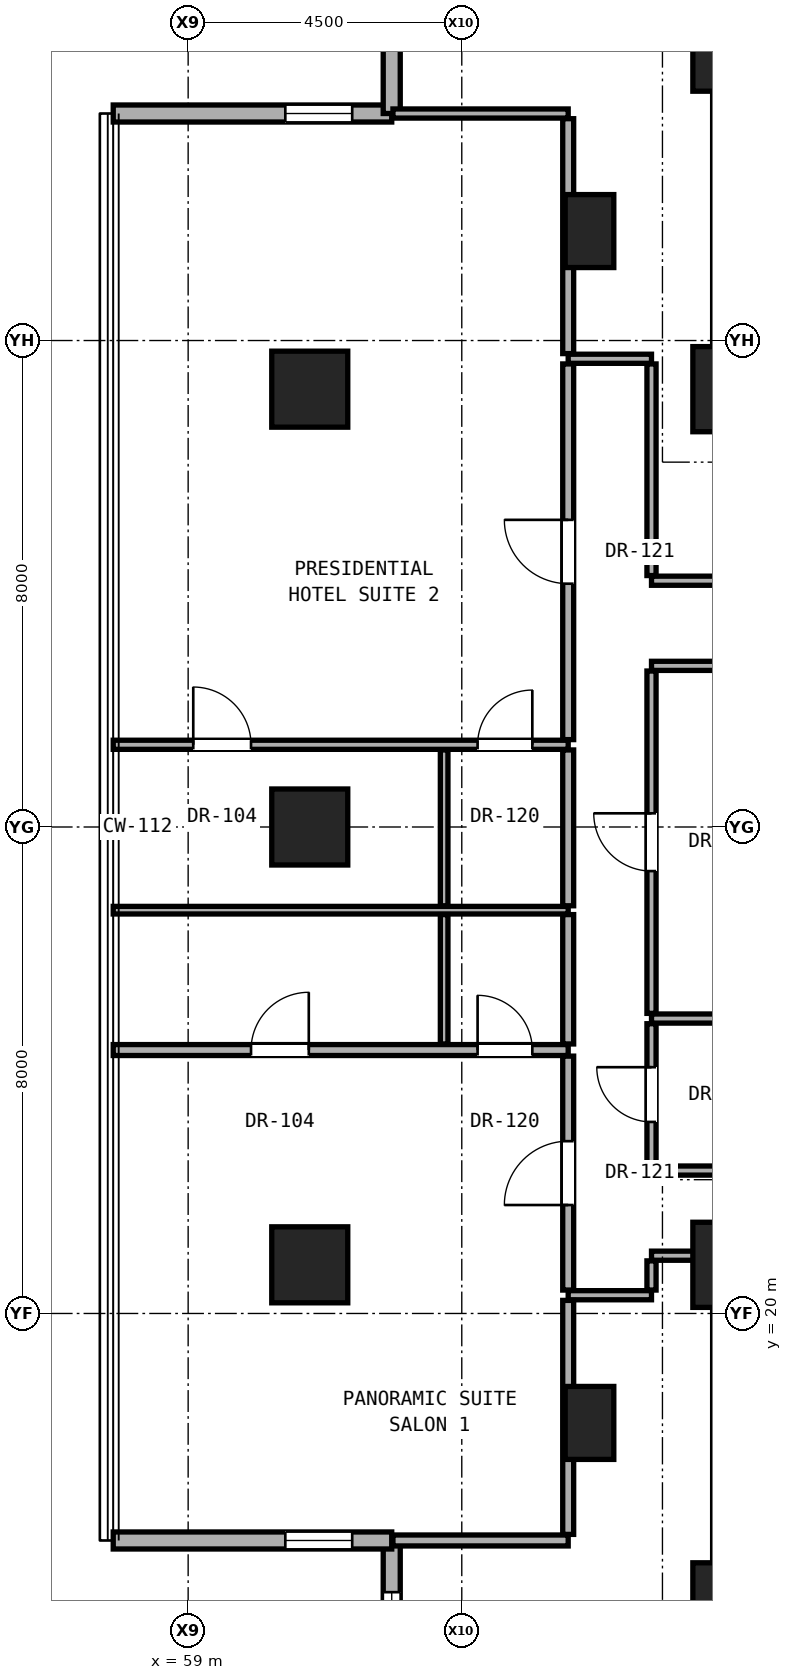
"""IFC4 building model, lengths in metres.
Left out: names, types, materials, properties, quantities, classifications, styles, units other than length and angle.
Written with IfcOpenShell. Run it as: python <this file> out.ifc"""

import sys

from ifc_helpers import new_model, si_unit, direction, frame, frame_2d, origin, origin_2d, place, context, subcontext, project, spatial, rectangle, hollow_rectangle, extrude, element, fill, save


model = new_model("IFC4")
c1 = context("Model", 3, precision=1e-05, world=origin(), true_north=direction((0.0, 1.0)))
c2 = subcontext(c1, "Body", "Model", "MODEL_VIEW")
j1 = project(units=[si_unit("LENGTHUNIT", "METRE"), si_unit("PLANEANGLEUNIT", "RADIAN")], contexts=[c1])
p1 = place(None, origin())
s1 = spatial("IfcSite", under=j1, at=p1, CompositionType="ELEMENT")
p2 = place(p1, origin())
s2 = spatial("IfcBuilding", under=s1, at=p2, CompositionType="ELEMENT")
p3 = place(p2, frame((0.0, 0.0, 35.6)))
s3 = spatial("IfcBuildingStorey", under=s2, at=p3, CompositionType="ELEMENT", Elevation=35.6)
for number, where, z_axis, x_axis in (
    (1, (68.0, 15.2, 0.0), (0.0, 0.0, 1.0), (1.0, 0.0, 0.0)),
    (2, (68.0, 20.8, 0.0), (0.0, 0.0, 1.0), (1.0, 0.0, 0.0)),
    (3, (68.0, 35.2, 0.0), (0.0, 0.0, 1.0), (1.0, 0.0, 0.0)),
    (4, (68.0, 40.8, 0.0), (0.0, 0.0, 1.0), (1.0, 0.0, 0.0)),
):
    element("IfcColumn", number, at=place(p3, frame(where, z_axis=z_axis, x_axis=x_axis)), inside=s3, PredefinedType="COLUMN", context=c2, shape_type="SweptSolid", body=[
        extrude(rectangle(XDim=1.4, YDim=1.4, at=origin_2d()), origin(), (0.0, 0.0, 1.0), 3.3),
    ])
for number, where, z_axis, x_axis in (
    (5, (61.0, 20.8, 0.0), (0.0, 0.0, 1.0), (1.0, 0.0, 0.0)),
    (6, (61.0, 28.0, 0.0), (0.0, 0.0, 1.0), (1.0, 0.0, 0.0)),
    (7, (61.0, 35.2, 0.0), (0.0, 0.0, 1.0), (1.0, 0.0, 0.0)),
):
    element("IfcColumn", number, at=place(p3, frame(where, z_axis=z_axis, x_axis=x_axis)), inside=s3, PredefinedType="COLUMN", context=c2, shape_type="SweptSolid", body=[
        extrude(hollow_rectangle(XDim=1.25, YDim=1.25, WallThickness=0.07, at=origin_2d()), origin(), (0.0, 0.0, 1.0), 3.3),
    ])
for number, where, z_axis, x_axis in (
    (8, (65.6, 18.2, 0.0), (0.0, 0.0, 1.0), (1.0, 0.0, 0.0)),
    (9, (65.6, 37.8, 0.0), (0.0, 0.0, 1.0), (1.0, 0.0, 0.0)),
):
    element("IfcColumn", number, at=place(p3, frame(where, z_axis=z_axis, x_axis=x_axis)), inside=s3, PredefinedType="PILASTER", context=c2, shape_type="SweptSolid", body=[
        extrude(rectangle(XDim=0.8, YDim=1.2, at=origin_2d()), origin(), (0.0, 0.0, 1.0), 3.3),
    ])
p4 = place(p3, frame((62.348, 16.267, 0.0), z_axis=(0.0, 0.0, 1.0), x_axis=(0.0, -1.0, 0.0)))
e10 = element("IfcWall", 10, at=p4, inside=s3, PredefinedType="SOLIDWALL", context=c2, shape_type="SweptSolid", body=[
    extrude(rectangle(XDim=4.58, YDim=0.28, at=frame_2d((2.29, 0.0))), origin(), (0.0, 0.0, 1.0), 3.04),
])
p5 = place(p4, frame((0.85, 0.0, 0.79)))
e11 = element("IfcOpeningElement", 11, at=p5, cuts=e10, PredefinedType="OPENING", context=c2, shape_type="SweptSolid", body=[
    extrude(rectangle(XDim=1.8, YDim=2.1, at=frame_2d((0.9, 1.05))), frame((0.0, 0.15, 0.0), z_axis=(0.0, -1.0, 0.0), x_axis=(1.0, 0.0, 0.0)), (0.0, 0.0, 1.0), 0.3),
])
p6 = place(p3, frame((57.768, 16.267, 0.0), z_axis=(0.0, 0.0, 1.0), x_axis=(1.0, 0.0, 0.0)))
e12 = element("IfcWall", 12, at=p6, inside=s3, PredefinedType="SOLIDWALL", context=c2, shape_type="SweptSolid", body=[
    extrude(rectangle(XDim=4.58, YDim=0.28, at=frame_2d((2.29, 0.0))), origin(), (0.0, 0.0, 1.0), 3.04),
])
p7 = place(p6, frame((2.83, 0.0, 0.85)))
e13 = element("IfcOpeningElement", 13, at=p7, cuts=e12, PredefinedType="OPENING", context=c2, shape_type="SweptSolid", body=[
    extrude(rectangle(XDim=1.1, YDim=2.0, at=frame_2d((0.55, 1.0))), frame((0.0, 0.15, 0.0), z_axis=(0.0, -1.0, 0.0), x_axis=(1.0, 0.0, 0.0)), (0.0, 0.0, 1.0), 0.3),
])
p8 = place(p3, frame((62.348, 39.733, 0.0), z_axis=(0.0, 0.0, 1.0), x_axis=(-1.0, 0.0, 0.0)))
e14 = element("IfcWall", 14, at=p8, inside=s3, PredefinedType="SOLIDWALL", context=c2, shape_type="SweptSolid", body=[
    extrude(rectangle(XDim=4.58, YDim=0.28, at=frame_2d((2.29, 0.0))), origin(), (0.0, 0.0, 1.0), 3.04),
])
p9 = place(p8, frame((0.65, 0.0, 0.85)))
e15 = element("IfcOpeningElement", 15, at=p9, cuts=e14, PredefinedType="OPENING", context=c2, shape_type="SweptSolid", body=[
    extrude(rectangle(XDim=1.1, YDim=2.0, at=frame_2d((0.55, 1.0))), frame((0.0, 0.15, 0.0), z_axis=(0.0, -1.0, 0.0), x_axis=(1.0, 0.0, 0.0)), (0.0, 0.0, 1.0), 0.3),
])
p10 = place(p3, frame((62.348, 44.313, 0.0), z_axis=(0.0, 0.0, 1.0), x_axis=(0.0, -1.0, 0.0)))
e16 = element("IfcWall", 16, at=p10, inside=s3, PredefinedType="SOLIDWALL", context=c2, shape_type="SweptSolid", body=[
    extrude(rectangle(XDim=4.58, YDim=0.28, at=frame_2d((2.29, 0.0))), origin(), (0.0, 0.0, 1.0), 3.04),
])
p11 = place(p3, frame((62.368, 16.267, 0.0), z_axis=(0.0, 0.0, 1.0), x_axis=(1.0, 0.0, 0.0)))
e17 = element("IfcWall", 17, at=p11, inside=s3, PredefinedType="PARTITIONING", context=c2, shape_type="SweptSolid", body=[
    extrude(rectangle(XDim=2.882, YDim=0.18, at=frame_2d((1.441, 0.0))), origin(), (0.0, 0.0, 1.0), 3.06),
])
p12 = place(p3, frame((65.25, 20.3, 0.0), z_axis=(0.0, 0.0, 1.0), x_axis=(1.0, 0.0, 0.0)))
e18 = element("IfcWall", 18, at=p12, inside=s3, PredefinedType="PARTITIONING", context=c2, shape_type="SweptSolid", body=[
    extrude(rectangle(XDim=1.37, YDim=0.15, at=frame_2d((0.685, 0.0))), origin(), (0.0, 0.0, 1.0), 3.06),
])
p13 = place(p3, frame((66.62, 20.95, 0.0), z_axis=(0.0, 0.0, 1.0), x_axis=(1.0, 0.0, 0.0)))
e19 = element("IfcWall", 19, at=p13, inside=s3, PredefinedType="PARTITIONING", context=c2, shape_type="SweptSolid", body=[
    extrude(rectangle(XDim=1.01, YDim=0.15, at=frame_2d((0.505, 0.0))), origin(), (0.0, 0.0, 1.0), 2.452),
])
p14 = place(p3, frame((66.62, 22.35, 0.0), z_axis=(0.0, 0.0, 1.0), x_axis=(1.0, 0.0, 0.0)))
e20 = element("IfcWall", 20, at=p14, inside=s3, PredefinedType="PARTITIONING", context=c2, shape_type="SweptSolid", body=[
    extrude(rectangle(XDim=19.63, YDim=0.15, at=frame_2d((9.815, 0.0))), origin(), (0.0, 0.0, 1.0), 2.125),
])
p15 = place(p14, frame((12.085, 0.0, 0.0)))
e21 = element("IfcOpeningElement", 21, at=p15, cuts=e20, PredefinedType="OPENING", context=c2, shape_type="SweptSolid", body=[
    extrude(rectangle(XDim=0.85, YDim=2.01, at=frame_2d((0.425, 1.005))), frame((0.0, 0.085, 0.0), z_axis=(0.0, -1.0, 0.0), x_axis=(1.0, 0.0, 0.0)), (0.0, 0.0, 1.0), 0.17),
])
p16 = place(p3, frame((57.768, 24.332, 0.0), z_axis=(0.0, 0.0, 1.0), x_axis=(1.0, 0.0, 0.0)))
e22 = element("IfcWall", 22, at=p16, inside=s3, PredefinedType="PARTITIONING", context=c2, shape_type="SweptSolid", body=[
    extrude(rectangle(XDim=7.482, YDim=0.18, at=frame_2d((3.741, 0.0))), origin(), (0.0, 0.0, 1.0), 2.196),
])
p17 = place(p16, frame((2.266, 0.0, 0.0)))
e23 = element("IfcOpeningElement", 23, at=p17, cuts=e22, PredefinedType="OPENING", context=c2, shape_type="SweptSolid", body=[
    extrude(rectangle(XDim=0.95, YDim=2.15, at=frame_2d((0.475, 1.075))), frame((0.0, 0.1, 0.0), z_axis=(0.0, -1.0, 0.0), x_axis=(1.0, 0.0, 0.0)), (0.0, 0.0, 1.0), 0.2),
])
p18 = place(p16, frame((5.992, 0.0, 0.0)))
e24 = element("IfcOpeningElement", 24, at=p18, cuts=e22, PredefinedType="OPENING", context=c2, shape_type="SweptSolid", body=[
    extrude(rectangle(XDim=0.9, YDim=2.1, at=frame_2d((0.45, 1.05))), frame((0.0, 0.1, 0.0), z_axis=(0.0, -1.0, 0.0), x_axis=(1.0, 0.0, 0.0)), (0.0, 0.0, 1.0), 0.2),
])
p19 = place(p3, frame((66.62, 24.85, 0.0), z_axis=(0.0, 0.0, 1.0), x_axis=(1.0, 0.0, 0.0)))
e25 = element("IfcWall", 25, at=p19, inside=s3, PredefinedType="PARTITIONING", context=c2, shape_type="SweptSolid", body=[
    extrude(rectangle(XDim=3.13, YDim=0.15, at=frame_2d((1.565, 0.0))), origin(), (0.0, 0.0, 1.0), 2.125),
])
p20 = place(p3, frame((57.768, 26.632, 0.0), z_axis=(0.0, 0.0, 1.0), x_axis=(1.0, 0.0, 0.0)))
e26 = element("IfcWall", 26, at=p20, inside=s3, PredefinedType="PARTITIONING", context=c2, shape_type="SweptSolid", body=[
    extrude(rectangle(XDim=7.482, YDim=0.125, at=frame_2d((3.741, 0.0))), origin(), (0.0, 0.0, 1.0), 2.196),
])
p21 = place(p3, frame((57.768, 29.352, 0.0), z_axis=(0.0, 0.0, 1.0), x_axis=(1.0, 0.0, 0.0)))
e27 = element("IfcWall", 27, at=p21, inside=s3, PredefinedType="PARTITIONING", context=c2, shape_type="SweptSolid", body=[
    extrude(rectangle(XDim=7.482, YDim=0.15, at=frame_2d((3.741, 0.0))), origin(), (0.0, 0.0, 1.0), 2.196),
])
p22 = place(p21, frame((1.316, 0.0, 0.0)))
e28 = element("IfcOpeningElement", 28, at=p22, cuts=e27, PredefinedType="OPENING", context=c2, shape_type="SweptSolid", body=[
    extrude(rectangle(XDim=0.95, YDim=2.15, at=frame_2d((0.475, 1.075))), frame((0.0, 0.085, 0.0), z_axis=(0.0, -1.0, 0.0), x_axis=(1.0, 0.0, 0.0)), (0.0, 0.0, 1.0), 0.17),
])
p23 = place(p21, frame((5.992, 0.0, 0.0)))
e29 = element("IfcOpeningElement", 29, at=p23, cuts=e27, PredefinedType="OPENING", context=c2, shape_type="SweptSolid", body=[
    extrude(rectangle(XDim=0.9, YDim=2.1, at=frame_2d((0.45, 1.05))), frame((0.0, 0.085, 0.0), z_axis=(0.0, -1.0, 0.0), x_axis=(1.0, 0.0, 0.0)), (0.0, 0.0, 1.0), 0.17),
])
p24 = place(p3, frame((66.62, 30.65, 0.0), z_axis=(0.0, 0.0, 1.0), x_axis=(1.0, 0.0, 0.0)))
e30 = element("IfcWall", 30, at=p24, inside=s3, PredefinedType="PARTITIONING", context=c2, shape_type="SweptSolid", body=[
    extrude(rectangle(XDim=19.63, YDim=0.15, at=frame_2d((9.815, 0.0))), origin(), (0.0, 0.0, 1.0), 2.125),
])
p25 = place(p24, frame((3.855, 0.0, 0.0)))
e31 = element("IfcOpeningElement", 31, at=p25, cuts=e30, PredefinedType="OPENING", context=c2, shape_type="SweptSolid", body=[
    extrude(rectangle(XDim=0.85, YDim=2.01, at=frame_2d((0.425, 1.005))), frame((0.0, 0.085, 0.0), z_axis=(0.0, -1.0, 0.0), x_axis=(1.0, 0.0, 0.0)), (0.0, 0.0, 1.0), 0.17),
])
p26 = place(p24, frame((12.085, 0.0, 0.0)))
e32 = element("IfcOpeningElement", 32, at=p26, cuts=e30, PredefinedType="OPENING", context=c2, shape_type="SweptSolid", body=[
    extrude(rectangle(XDim=0.85, YDim=2.01, at=frame_2d((0.425, 1.005))), frame((0.0, 0.085, 0.0), z_axis=(0.0, -1.0, 0.0), x_axis=(1.0, 0.0, 0.0)), (0.0, 0.0, 1.0), 0.17),
])
p27 = place(p3, frame((66.62, 32.05, 0.0), z_axis=(0.0, 0.0, 1.0), x_axis=(1.0, 0.0, 0.0)))
e33 = element("IfcWall", 33, at=p27, inside=s3, PredefinedType="PARTITIONING", context=c2, shape_type="SweptSolid", body=[
    extrude(rectangle(XDim=2.18, YDim=0.15, at=frame_2d((1.09, 0.0))), origin(), (0.0, 0.0, 1.0), 2.125),
])
p28 = place(p3, frame((65.25, 35.7, 0.0), z_axis=(0.0, 0.0, 1.0), x_axis=(1.0, 0.0, 0.0)))
e34 = element("IfcWall", 34, at=p28, inside=s3, PredefinedType="PARTITIONING", context=c2, shape_type="SweptSolid", body=[
    extrude(rectangle(XDim=1.37, YDim=0.15, at=frame_2d((0.685, 0.0))), origin(), (0.0, 0.0, 1.0), 3.06),
])
p29 = place(p3, frame((62.368, 39.733, 0.0), z_axis=(0.0, 0.0, 1.0), x_axis=(1.0, 0.0, 0.0)))
e35 = element("IfcWall", 35, at=p29, inside=s3, PredefinedType="PARTITIONING", context=c2, shape_type="SweptSolid", body=[
    extrude(rectangle(XDim=2.882, YDim=0.15, at=frame_2d((1.441, 0.0))), origin(), (0.0, 0.0, 1.0), 3.06),
])
p30 = place(p3, frame((63.21, 24.432, 0.0), z_axis=(0.0, 0.0, 1.0), x_axis=(0.0, 1.0, 0.0)))
e36 = element("IfcWall", 36, at=p30, inside=s3, PredefinedType="PARTITIONING", context=c2, shape_type="SweptSolid", body=[
    extrude(rectangle(XDim=2.128, YDim=0.125, at=frame_2d((1.064, 0.0))), origin(), (0.0, 0.0, 1.0), 3.06),
])
p31 = place(p3, frame((63.21, 26.705, 0.0), z_axis=(0.0, 0.0, 1.0), x_axis=(0.0, 1.0, 0.0)))
e37 = element("IfcWall", 37, at=p31, inside=s3, PredefinedType="PARTITIONING", context=c2, shape_type="SweptSolid", body=[
    extrude(rectangle(XDim=2.562, YDim=0.125, at=frame_2d((1.281, 0.0))), origin(), (0.0, 0.0, 1.0), 2.279),
])
p32 = place(p3, frame((65.25, 16.367, 0.0), z_axis=(0.0, 0.0, 1.0), x_axis=(0.0, 1.0, 0.0)))
e38 = element("IfcWall", 38, at=p32, inside=s3, PredefinedType="PARTITIONING", context=c2, shape_type="SweptSolid", body=[
    extrude(rectangle(XDim=3.848, YDim=0.18, at=frame_2d((1.924, 0.0))), origin(), (0.0, 0.0, 1.0), 2.436),
])
p33 = place(p3, frame((65.25, 20.385, 0.0), z_axis=(0.0, 0.0, 1.0), x_axis=(0.0, 1.0, 0.0)))
e39 = element("IfcWall", 39, at=p33, inside=s3, PredefinedType="PARTITIONING", context=c2, shape_type="SweptSolid", body=[
    extrude(rectangle(XDim=3.847, YDim=0.18, at=frame_2d((1.923, 0.0))), origin(), (0.0, 0.0, 1.0), 2.452),
])
p34 = place(p33, frame((1.398, 0.0, 0.0)))
e40 = element("IfcOpeningElement", 40, at=p34, cuts=e39, PredefinedType="OPENING", context=c2, shape_type="SweptSolid", body=[
    extrude(rectangle(XDim=1.05, YDim=2.2, at=frame_2d((0.525, 1.1))), frame((0.0, 0.1, 0.0), z_axis=(0.0, -1.0, 0.0), x_axis=(1.0, 0.0, 0.0)), (0.0, 0.0, 1.0), 0.2),
])
p35 = place(p3, frame((65.25, 24.432, 0.0), z_axis=(0.0, 0.0, 1.0), x_axis=(0.0, 1.0, 0.0)))
e41 = element("IfcWall", 41, at=p35, inside=s3, PredefinedType="PARTITIONING", context=c2, shape_type="SweptSolid", body=[
    extrude(rectangle(XDim=2.128, YDim=0.18, at=frame_2d((1.064, 0.0))), origin(), (0.0, 0.0, 1.0), 3.06),
])
p36 = place(p3, frame((65.25, 26.705, 0.0), z_axis=(0.0, 0.0, 1.0), x_axis=(0.0, 1.0, 0.0)))
e42 = element("IfcWall", 42, at=p36, inside=s3, PredefinedType="PARTITIONING", context=c2, shape_type="SweptSolid", body=[
    extrude(rectangle(XDim=2.562, YDim=0.18, at=frame_2d((1.281, 0.0))), origin(), (0.0, 0.0, 1.0), 2.279),
])
p37 = place(p3, frame((65.25, 29.437, 0.0), z_axis=(0.0, 0.0, 1.0), x_axis=(0.0, 1.0, 0.0)))
e43 = element("IfcWall", 43, at=p37, inside=s3, PredefinedType="PARTITIONING", context=c2, shape_type="SweptSolid", body=[
    extrude(rectangle(XDim=6.178, YDim=0.18, at=frame_2d((3.089, 0.0))), origin(), (0.0, 0.0, 1.0), 2.452),
])
p38 = place(p37, frame((2.564, 0.0, 0.0)))
e44 = element("IfcOpeningElement", 44, at=p38, cuts=e43, PredefinedType="OPENING", context=c2, shape_type="SweptSolid", body=[
    extrude(rectangle(XDim=1.05, YDim=2.2, at=frame_2d((0.525, 1.1))), frame((0.0, 0.1, 0.0), z_axis=(0.0, -1.0, 0.0), x_axis=(1.0, 0.0, 0.0)), (0.0, 0.0, 1.0), 0.2),
])
p39 = place(p3, frame((65.25, 35.785, 0.0), z_axis=(0.0, 0.0, 1.0), x_axis=(0.0, 1.0, 0.0)))
e45 = element("IfcWall", 45, at=p39, inside=s3, PredefinedType="PARTITIONING", context=c2, shape_type="SweptSolid", body=[
    extrude(rectangle(XDim=3.863, YDim=0.18, at=frame_2d((1.932, 0.0))), origin(), (0.0, 0.0, 1.0), 2.436),
])
p40 = place(p3, frame((66.62, 20.385, 0.0), z_axis=(0.0, 0.0, 1.0), x_axis=(0.0, 1.0, 0.0)))
e46 = element("IfcWall", 46, at=p40, inside=s3, PredefinedType="PARTITIONING", context=c2, shape_type="SweptSolid", body=[
    extrude(rectangle(XDim=0.48, YDim=0.15, at=frame_2d((0.24, 0.0))), origin(), (0.0, 0.0, 1.0), 2.452),
])
p41 = place(p3, frame((66.62, 22.435, 0.0), z_axis=(0.0, 0.0, 1.0), x_axis=(0.0, 1.0, 0.0)))
e47 = element("IfcWall", 47, at=p41, inside=s3, PredefinedType="PARTITIONING", context=c2, shape_type="SweptSolid", body=[
    extrude(rectangle(XDim=2.33, YDim=0.15, at=frame_2d((1.165, 0.0))), origin(), (0.0, 0.0, 1.0), 3.06),
])
p42 = place(p41, frame((0.715, 0.0, 0.0)))
e48 = element("IfcOpeningElement", 48, at=p42, cuts=e47, PredefinedType="OPENING", context=c2, shape_type="SweptSolid", body=[
    extrude(rectangle(XDim=0.9, YDim=2.1, at=frame_2d((0.45, 1.05))), frame((0.0, 0.085, 0.0), z_axis=(0.0, -1.0, 0.0), x_axis=(1.0, 0.0, 0.0)), (0.0, 0.0, 1.0), 0.17),
])
p43 = place(p3, frame((66.62, 24.935, 0.0), z_axis=(0.0, 0.0, 1.0), x_axis=(0.0, 1.0, 0.0)))
e49 = element("IfcWall", 49, at=p43, inside=s3, PredefinedType="PARTITIONING", context=c2, shape_type="SweptSolid", body=[
    extrude(rectangle(XDim=5.63, YDim=0.15, at=frame_2d((2.815, 0.0))), origin(), (0.0, 0.0, 1.0), 2.279),
])
p44 = place(p43, frame((2.34, 0.0, 0.0)))
e50 = element("IfcOpeningElement", 50, at=p44, cuts=e49, PredefinedType="OPENING", context=c2, shape_type="SweptSolid", body=[
    extrude(rectangle(XDim=0.95, YDim=2.15, at=frame_2d((0.475, 1.075))), frame((0.0, 0.085, 0.0), z_axis=(0.0, -1.0, 0.0), x_axis=(1.0, 0.0, 0.0)), (0.0, 0.0, 1.0), 0.17),
])
p45 = place(p3, frame((66.62, 32.135, 0.0), z_axis=(0.0, 0.0, 1.0), x_axis=(0.0, 1.0, 0.0)))
e51 = element("IfcWall", 51, at=p45, inside=s3, PredefinedType="PARTITIONING", context=c2, shape_type="SweptSolid", body=[
    extrude(rectangle(XDim=3.48, YDim=0.15, at=frame_2d((1.74, 0.0))), origin(), (0.0, 0.0, 1.0), 2.452),
])
p46 = place(p5, origin())
e52 = element("IfcWindow", 52, at=p46, inside=s3, PartitioningType="SINGLE_PANEL", PredefinedType="WINDOW", context=c2, shape_type="SweptSolid", body=[
    extrude(rectangle(XDim=1.8, YDim=2.1, at=frame_2d((0.9, 1.05))), frame((0.0, 0.03, 0.0), z_axis=(0.0, -1.0, 0.0), x_axis=(1.0, 0.0, 0.0)), (0.0, 0.0, 1.0), 0.06),
])
fill(e11, e52)
p47 = place(p7, origin())
e53 = element("IfcWindow", 53, at=p47, inside=s3, PartitioningType="SINGLE_PANEL", PredefinedType="WINDOW", context=c2, shape_type="SweptSolid", body=[
    extrude(rectangle(XDim=1.1, YDim=2.0, at=frame_2d((0.55, 1.0))), frame((0.0, 0.03, 0.0), z_axis=(0.0, -1.0, 0.0), x_axis=(1.0, 0.0, 0.0)), (0.0, 0.0, 1.0), 0.06),
])
fill(e13, e53)
p48 = place(p9, origin())
e54 = element("IfcWindow", 54, at=p48, inside=s3, PartitioningType="SINGLE_PANEL", PredefinedType="WINDOW", context=c2, shape_type="SweptSolid", body=[
    extrude(rectangle(XDim=1.1, YDim=2.0, at=frame_2d((0.55, 1.0))), frame((0.0, 0.03, 0.0), z_axis=(0.0, -1.0, 0.0), x_axis=(1.0, 0.0, 0.0)), (0.0, 0.0, 1.0), 0.06),
])
fill(e15, e54)
p49 = place(p42, origin())
e55 = element("IfcDoor", 55, at=p49, inside=s3, OperationType="SINGLE_SWING_RIGHT", PredefinedType="DOOR", context=c2, shape_type="SweptSolid", body=[
    extrude(rectangle(XDim=0.9, YDim=2.1, at=frame_2d((0.45, 1.05))), frame((0.0, 0.025, 0.0), z_axis=(0.0, -1.0, 0.0), x_axis=(1.0, 0.0, 0.0)), (0.0, 0.0, 1.0), 0.05),
])
fill(e48, e55)
p50 = place(p34, origin())
e56 = element("IfcDoor", 56, at=p50, inside=s3, OperationType="SINGLE_SWING_LEFT", PredefinedType="DOOR", context=c2, shape_type="SweptSolid", body=[
    extrude(rectangle(XDim=1.05, YDim=2.2, at=frame_2d((0.525, 1.1))), frame((0.0, 0.025, 0.0), z_axis=(0.0, -1.0, 0.0), x_axis=(1.0, 0.0, 0.0)), (0.0, 0.0, 1.0), 0.05),
])
fill(e40, e56)
p51 = place(p17, origin())
e57 = element("IfcDoor", 57, at=p51, inside=s3, OperationType="SINGLE_SWING_RIGHT", PredefinedType="DOOR", context=c2, shape_type="SweptSolid", body=[
    extrude(rectangle(XDim=0.95, YDim=2.15, at=frame_2d((0.475, 1.075))), frame((0.0, 0.025, 0.0), z_axis=(0.0, -1.0, 0.0), x_axis=(1.0, 0.0, 0.0)), (0.0, 0.0, 1.0), 0.05),
])
fill(e23, e57)
p52 = place(p18, origin())
e58 = element("IfcDoor", 58, at=p52, inside=s3, OperationType="SINGLE_SWING_LEFT", PredefinedType="DOOR", context=c2, shape_type="SweptSolid", body=[
    extrude(rectangle(XDim=0.9, YDim=2.1, at=frame_2d((0.45, 1.05))), frame((0.0, 0.025, 0.0), z_axis=(0.0, -1.0, 0.0), x_axis=(1.0, 0.0, 0.0)), (0.0, 0.0, 1.0), 0.05),
])
fill(e24, e58)
p53 = place(p38, origin())
e59 = element("IfcDoor", 59, at=p53, inside=s3, OperationType="SINGLE_SWING_RIGHT", PredefinedType="DOOR", context=c2, shape_type="SweptSolid", body=[
    extrude(rectangle(XDim=1.05, YDim=2.2, at=frame_2d((0.525, 1.1))), frame((0.0, 0.025, 0.0), z_axis=(0.0, -1.0, 0.0), x_axis=(1.0, 0.0, 0.0)), (0.0, 0.0, 1.0), 0.05),
])
fill(e44, e59)
p54 = place(p22, origin())
e60 = element("IfcDoor", 60, at=p54, inside=s3, OperationType="SINGLE_SWING_LEFT", PredefinedType="DOOR", context=c2, shape_type="SweptSolid", body=[
    extrude(rectangle(XDim=0.95, YDim=2.15, at=frame_2d((0.475, 1.075))), frame((0.0, 0.025, 0.0), z_axis=(0.0, -1.0, 0.0), x_axis=(1.0, 0.0, 0.0)), (0.0, 0.0, 1.0), 0.05),
])
fill(e28, e60)
p55 = place(p23, origin())
e61 = element("IfcDoor", 61, at=p55, inside=s3, OperationType="SINGLE_SWING_RIGHT", PredefinedType="DOOR", context=c2, shape_type="SweptSolid", body=[
    extrude(rectangle(XDim=0.9, YDim=2.1, at=frame_2d((0.45, 1.05))), frame((0.0, 0.025, 0.0), z_axis=(0.0, -1.0, 0.0), x_axis=(1.0, 0.0, 0.0)), (0.0, 0.0, 1.0), 0.05),
])
fill(e29, e61)
p56 = place(p44, origin())
e62 = element("IfcDoor", 62, at=p56, inside=s3, OperationType="SINGLE_SWING_RIGHT", PredefinedType="DOOR", context=c2, shape_type="SweptSolid", body=[
    extrude(rectangle(XDim=0.95, YDim=2.15, at=frame_2d((0.475, 1.075))), frame((0.0, 0.025, 0.0), z_axis=(0.0, -1.0, 0.0), x_axis=(1.0, 0.0, 0.0)), (0.0, 0.0, 1.0), 0.05),
])
fill(e50, e62)
save(model, sys.argv[1])
